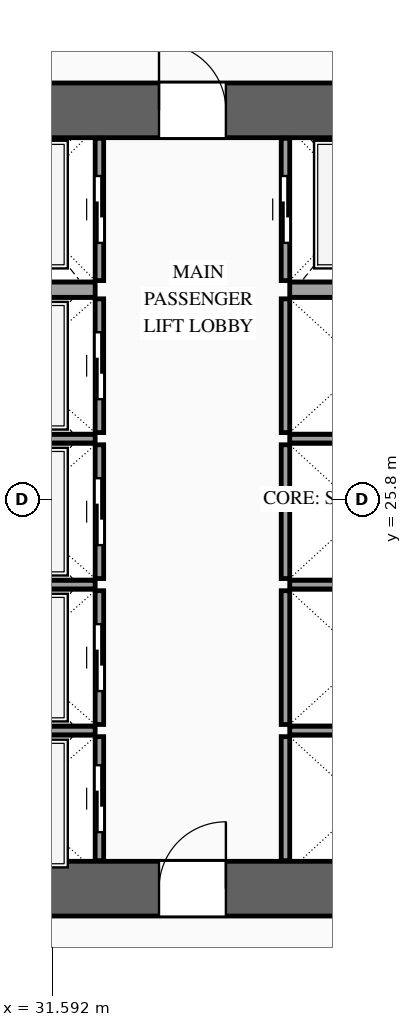
"""IFC4 building model, lengths in metres.
Left out: names, types, materials, properties, quantities, classifications, styles, units other than length and angle.
Written with IfcOpenShell. Run it as: python <this file> out.ifc"""

import sys

from ifc_helpers import new_model, si_unit, direction, frame, frame_2d, origin, place, context, subcontext, project, spatial, rectangle, extrude, source, transform, mapped, element, fill, save


model = new_model("IFC4")
c1 = context("Model", 3, precision=1e-05, world=origin(), true_north=direction((0.0, 1.0)))
c2 = subcontext(c1, "Body", "Model", "MODEL_VIEW")
j1 = project(units=[si_unit("LENGTHUNIT", "METRE"), si_unit("PLANEANGLEUNIT", "RADIAN")], contexts=[c1])
p1 = place(None, origin())
s1 = spatial("IfcSite", under=j1, at=p1, CompositionType="ELEMENT")
p2 = place(p1, origin())
s2 = spatial("IfcBuilding", under=s1, at=p2, CompositionType="ELEMENT")
p3 = place(p2, frame((0.0, 0.0, 82.0)))
s3 = spatial("IfcBuildingStorey", under=s2, at=p3, CompositionType="ELEMENT", Elevation=82.0)
p4 = place(p3, frame((23.35, 19.4, 0.0), z_axis=(0.0, 0.0, 1.0), x_axis=(1.0, 0.0, 0.0)))
e1 = element("IfcWall", 1, at=p4, inside=s3, PredefinedType="SHEAR", context=c2, shape_type="SweptSolid", body=[
    extrude(rectangle(XDim=27.3, YDim=0.9, at=frame_2d((13.65, 0.0))), origin(), (0.0, 0.0, 1.0), 3.6),
])
p5 = place(p4, frame((2.1, 0.0, 0.0)))
e2 = element("IfcOpeningElement", 2, at=p5, cuts=e1, PredefinedType="OPENING", context=c2, shape_type="SweptSolid", body=[
    extrude(rectangle(XDim=1.1, YDim=2.2, at=frame_2d((0.55, 1.1))), frame((0.0, 0.465, 0.0), z_axis=(0.0, -1.0, 0.0), x_axis=(1.0, 0.0, 0.0)), (0.0, 0.0, 1.0), 0.93),
])
p6 = place(p4, frame((10.0, 0.0, 0.0)))
e3 = element("IfcOpeningElement", 3, at=p6, cuts=e1, PredefinedType="OPENING", context=c2, shape_type="SweptSolid", body=[
    extrude(rectangle(XDim=1.1, YDim=2.2, at=frame_2d((0.55, 1.1))), frame((0.0, 0.465, 0.0), z_axis=(0.0, -1.0, 0.0), x_axis=(1.0, 0.0, 0.0)), (0.0, 0.0, 1.0), 0.93),
])
p7 = place(p4, frame((23.2, 0.0, 0.0)))
e4 = element("IfcOpeningElement", 4, at=p7, cuts=e1, PredefinedType="OPENING", context=c2, shape_type="SweptSolid", body=[
    extrude(rectangle(XDim=1.1, YDim=2.2, at=frame_2d((0.55, 1.1))), frame((0.0, 0.465, 0.0), z_axis=(0.0, -1.0, 0.0), x_axis=(1.0, 0.0, 0.0)), (0.0, 0.0, 1.0), 0.93),
])
p8 = place(p4, frame((19.82, 0.0, 0.0)))
e5 = element("IfcOpeningElement", 5, at=p8, cuts=e1, PredefinedType="OPENING", context=c2, shape_type="SweptSolid", body=[
    extrude(rectangle(XDim=0.9, YDim=2.15, at=frame_2d((0.45, 1.075))), frame((0.0, 0.465, 0.0), z_axis=(0.0, -1.0, 0.0), x_axis=(1.0, 0.0, 0.0)), (0.0, 0.0, 1.0), 0.93),
])
p9 = place(p4, frame((18.38, 0.0, 0.0)))
e6 = element("IfcOpeningElement", 6, at=p9, cuts=e1, PredefinedType="OPENING", context=c2, shape_type="SweptSolid", body=[
    extrude(rectangle(XDim=0.9, YDim=2.15, at=frame_2d((0.45, 1.075))), frame((0.0, 0.465, 0.0), z_axis=(0.0, -1.0, 0.0), x_axis=(1.0, 0.0, 0.0)), (0.0, 0.0, 1.0), 0.93),
])
p10 = place(p3, frame((23.35, 32.2, 0.0), z_axis=(0.0, 0.0, 1.0), x_axis=(1.0, 0.0, 0.0)))
e7 = element("IfcWall", 7, at=p10, inside=s3, PredefinedType="SHEAR", context=c2, shape_type="SweptSolid", body=[
    extrude(rectangle(XDim=27.3, YDim=0.9, at=frame_2d((13.65, 0.0))), origin(), (0.0, 0.0, 1.0), 3.6),
])
p11 = place(p10, frame((4.72, 0.0, 0.0)))
e8 = element("IfcOpeningElement", 8, at=p11, cuts=e7, PredefinedType="OPENING", context=c2, shape_type="SweptSolid", body=[
    extrude(rectangle(XDim=0.9, YDim=2.15, at=frame_2d((0.45, 1.075))), frame((0.0, 0.465, 0.0), z_axis=(0.0, -1.0, 0.0), x_axis=(1.0, 0.0, 0.0)), (0.0, 0.0, 1.0), 0.93),
])
p12 = place(p10, frame((10.0, 0.0, 0.0)))
e9 = element("IfcOpeningElement", 9, at=p12, cuts=e7, PredefinedType="OPENING", context=c2, shape_type="SweptSolid", body=[
    extrude(rectangle(XDim=1.1, YDim=2.2, at=frame_2d((0.55, 1.1))), frame((0.0, 0.465, 0.0), z_axis=(0.0, -1.0, 0.0), x_axis=(1.0, 0.0, 0.0)), (0.0, 0.0, 1.0), 0.93),
])
p13 = place(p10, frame((15.85, 0.0, 0.0)))
e10 = element("IfcOpeningElement", 10, at=p13, cuts=e7, PredefinedType="OPENING", context=c2, shape_type="SweptSolid", body=[
    extrude(rectangle(XDim=1.1, YDim=2.2, at=frame_2d((0.55, 1.1))), frame((0.0, 0.465, 0.0), z_axis=(0.0, -1.0, 0.0), x_axis=(1.0, 0.0, 0.0)), (0.0, 0.0, 1.0), 0.93),
])
p14 = place(p3, frame((32.37, 19.86, 0.0), z_axis=(0.0, 0.0, 1.0), x_axis=(0.0, 1.0, 0.0)))
e11 = element("IfcWall", 11, at=p14, inside=s3, PredefinedType="SOLIDWALL", context=c2, shape_type="SweptSolid", body=[
    extrude(rectangle(XDim=2.04, YDim=0.14, at=frame_2d((1.02, 0.0))), origin(), (0.0, 0.0, 1.0), 3.32),
])
p15 = place(p14, frame((0.47, 0.0, 0.0)))
e12 = element("IfcOpeningElement", 12, at=p15, cuts=e11, PredefinedType="OPENING", context=c2, shape_type="SweptSolid", body=[
    extrude(rectangle(XDim=1.1, YDim=2.2, at=frame_2d((0.55, 1.1))), frame((0.0, 0.085, 0.0), z_axis=(0.0, -1.0, 0.0), x_axis=(1.0, 0.0, 0.0)), (0.0, 0.0, 1.0), 0.17),
])
m1 = source(origin(), c2, "Body", "SweptSolid", [
    extrude(rectangle(XDim=2.5, YDim=0.14, at=frame_2d((1.25, 0.0))), origin(), (0.0, 0.0, 1.0), 3.32),
])
p16 = place(p3, frame((29.8, 22.0, 0.0), z_axis=(0.0, 0.0, 1.0), x_axis=(1.0, 0.0, 0.0)))
e13 = element("IfcWall", 13, at=p16, inside=s3, PredefinedType="SOLIDWALL", context=c2, shape_type="MappedRepresentation", body=[
    mapped(m1, transform((0.0, 0.0, 0.0), scale=1.0)),
])
p17 = place(p3, frame((32.37, 22.1, 0.0), z_axis=(0.0, 0.0, 1.0), x_axis=(0.0, 1.0, 0.0)))
e14 = element("IfcWall", 14, at=p17, inside=s3, PredefinedType="SOLIDWALL", context=c2, shape_type="SweptSolid", body=[
    extrude(rectangle(XDim=2.2, YDim=0.14, at=frame_2d((1.1, 0.0))), origin(), (0.0, 0.0, 1.0), 3.32),
])
p18 = place(p17, frame((0.55, 0.0, 0.0)))
e15 = element("IfcOpeningElement", 15, at=p18, cuts=e14, PredefinedType="OPENING", context=c2, shape_type="SweptSolid", body=[
    extrude(rectangle(XDim=1.1, YDim=2.2, at=frame_2d((0.55, 1.1))), frame((0.0, 0.085, 0.0), z_axis=(0.0, -1.0, 0.0), x_axis=(1.0, 0.0, 0.0)), (0.0, 0.0, 1.0), 0.17),
])
p19 = place(p3, frame((29.8, 24.4, 0.0), z_axis=(0.0, 0.0, 1.0), x_axis=(1.0, 0.0, 0.0)))
e16 = element("IfcWall", 16, at=p19, inside=s3, PredefinedType="SOLIDWALL", context=c2, shape_type="MappedRepresentation", body=[
    mapped(m1, transform((0.0, 0.0, 0.0), scale=1.0)),
])
p20 = place(p3, frame((32.37, 24.5, 0.0), z_axis=(0.0, 0.0, 1.0), x_axis=(0.0, 1.0, 0.0)))
e17 = element("IfcWall", 17, at=p20, inside=s3, PredefinedType="SOLIDWALL", context=c2, shape_type="SweptSolid", body=[
    extrude(rectangle(XDim=2.2, YDim=0.14, at=frame_2d((1.1, 0.0))), origin(), (0.0, 0.0, 1.0), 3.32),
])
p21 = place(p20, frame((0.55, 0.0, 0.0)))
e18 = element("IfcOpeningElement", 18, at=p21, cuts=e17, PredefinedType="OPENING", context=c2, shape_type="SweptSolid", body=[
    extrude(rectangle(XDim=1.1, YDim=2.2, at=frame_2d((0.55, 1.1))), frame((0.0, 0.085, 0.0), z_axis=(0.0, -1.0, 0.0), x_axis=(1.0, 0.0, 0.0)), (0.0, 0.0, 1.0), 0.17),
])
p22 = place(p3, frame((29.8, 26.8, 0.0), z_axis=(0.0, 0.0, 1.0), x_axis=(1.0, 0.0, 0.0)))
e19 = element("IfcWall", 19, at=p22, inside=s3, PredefinedType="SOLIDWALL", context=c2, shape_type="MappedRepresentation", body=[
    mapped(m1, transform((0.0, 0.0, 0.0), scale=1.0)),
])
p23 = place(p3, frame((32.37, 26.9, 0.0), z_axis=(0.0, 0.0, 1.0), x_axis=(0.0, 1.0, 0.0)))
e20 = element("IfcWall", 20, at=p23, inside=s3, PredefinedType="SOLIDWALL", context=c2, shape_type="SweptSolid", body=[
    extrude(rectangle(XDim=2.2, YDim=0.14, at=frame_2d((1.1, 0.0))), origin(), (0.0, 0.0, 1.0), 3.32),
])
p24 = place(p23, frame((0.55, 0.0, 0.0)))
e21 = element("IfcOpeningElement", 21, at=p24, cuts=e20, PredefinedType="OPENING", context=c2, shape_type="SweptSolid", body=[
    extrude(rectangle(XDim=1.1, YDim=2.2, at=frame_2d((0.55, 1.1))), frame((0.0, 0.085, 0.0), z_axis=(0.0, -1.0, 0.0), x_axis=(1.0, 0.0, 0.0)), (0.0, 0.0, 1.0), 0.17),
])
p25 = place(p3, frame((32.37, 29.4, 0.0), z_axis=(0.0, 0.0, 1.0), x_axis=(0.0, 1.0, 0.0)))
e22 = element("IfcWall", 22, at=p25, inside=s3, PredefinedType="SOLIDWALL", context=c2, shape_type="SweptSolid", body=[
    extrude(rectangle(XDim=2.34, YDim=0.14, at=frame_2d((1.17, 0.0))), origin(), (0.0, 0.0, 1.0), 3.32),
])
p26 = place(p25, frame((0.62, 0.0, 0.0)))
e23 = element("IfcOpeningElement", 23, at=p26, cuts=e22, PredefinedType="OPENING", context=c2, shape_type="SweptSolid", body=[
    extrude(rectangle(XDim=1.1, YDim=2.2, at=frame_2d((0.55, 1.1))), frame((0.0, 0.085, 0.0), z_axis=(0.0, -1.0, 0.0), x_axis=(1.0, 0.0, 0.0)), (0.0, 0.0, 1.0), 0.17),
])
m2 = source(origin(), c2, "Body", "SweptSolid", [
    extrude(rectangle(XDim=2.5, YDim=0.25, at=frame_2d((1.25, 0.0))), origin(), (0.0, 0.0, 1.0), 3.32),
])
p27 = place(p3, frame((29.8, 29.25, 0.0), z_axis=(0.0, 0.0, 1.0), x_axis=(1.0, 0.0, 0.0)))
e24 = element("IfcWall", 24, at=p27, inside=s3, PredefinedType="SOLIDWALL", context=c2, shape_type="MappedRepresentation", body=[
    mapped(m2, transform((0.0, 0.0, 0.0), scale=1.0)),
])
m3 = source(origin(), c2, "Body", "SweptSolid", [
    extrude(rectangle(XDim=2.04, YDim=0.14, at=frame_2d((1.02, 0.0))), origin(), (0.0, 0.0, 1.0), 3.32),
])
p28 = place(p3, frame((35.43, 19.86, 0.0), z_axis=(0.0, 0.0, 1.0), x_axis=(0.0, 1.0, 0.0)))
e25 = element("IfcWall", 25, at=p28, inside=s3, PredefinedType="SOLIDWALL", context=c2, shape_type="MappedRepresentation", body=[
    mapped(m3, transform((0.0, 0.0, 0.0), scale=1.0)),
])
m4 = source(origin(), c2, "Body", "SweptSolid", [
    extrude(rectangle(XDim=2.4, YDim=0.14, at=frame_2d((1.2, 0.0))), origin(), (0.0, 0.0, 1.0), 3.32),
])
p29 = place(p3, frame((35.5, 22.0, 0.0), z_axis=(0.0, 0.0, 1.0), x_axis=(1.0, 0.0, 0.0)))
e26 = element("IfcWall", 26, at=p29, inside=s3, PredefinedType="SOLIDWALL", context=c2, shape_type="MappedRepresentation", body=[
    mapped(m4, transform((0.0, 0.0, 0.0), scale=1.0)),
])
m5 = source(origin(), c2, "Body", "SweptSolid", [
    extrude(rectangle(XDim=2.2, YDim=0.14, at=frame_2d((1.1, 0.0))), origin(), (0.0, 0.0, 1.0), 3.32),
])
p30 = place(p3, frame((35.43, 22.1, 0.0), z_axis=(0.0, 0.0, 1.0), x_axis=(0.0, 1.0, 0.0)))
e27 = element("IfcWall", 27, at=p30, inside=s3, PredefinedType="SOLIDWALL", context=c2, shape_type="MappedRepresentation", body=[
    mapped(m5, transform((0.0, 0.0, 0.0), scale=1.0)),
])
p31 = place(p3, frame((35.5, 24.4, 0.0), z_axis=(0.0, 0.0, 1.0), x_axis=(1.0, 0.0, 0.0)))
e28 = element("IfcWall", 28, at=p31, inside=s3, PredefinedType="SOLIDWALL", context=c2, shape_type="MappedRepresentation", body=[
    mapped(m4, transform((0.0, 0.0, 0.0), scale=1.0)),
])
p32 = place(p3, frame((35.43, 24.5, 0.0), z_axis=(0.0, 0.0, 1.0), x_axis=(0.0, 1.0, 0.0)))
e29 = element("IfcWall", 29, at=p32, inside=s3, PredefinedType="SOLIDWALL", context=c2, shape_type="MappedRepresentation", body=[
    mapped(m5, transform((0.0, 0.0, 0.0), scale=1.0)),
])
p33 = place(p3, frame((35.5, 26.8, 0.0), z_axis=(0.0, 0.0, 1.0), x_axis=(1.0, 0.0, 0.0)))
e30 = element("IfcWall", 30, at=p33, inside=s3, PredefinedType="SOLIDWALL", context=c2, shape_type="MappedRepresentation", body=[
    mapped(m4, transform((0.0, 0.0, 0.0), scale=1.0)),
])
m6 = source(origin(), c2, "Body", "SweptSolid", [
    extrude(rectangle(XDim=2.2, YDim=0.14, at=frame_2d((1.1, 0.0))), origin(), (0.0, 0.0, 1.0), 3.32),
])
p34 = place(p3, frame((35.43, 26.9, 0.0), z_axis=(0.0, 0.0, 1.0), x_axis=(0.0, 1.0, 0.0)))
e31 = element("IfcWall", 31, at=p34, inside=s3, PredefinedType="SOLIDWALL", context=c2, shape_type="MappedRepresentation", body=[
    mapped(m6, transform((0.0, 0.0, 0.0), scale=1.0)),
])
p35 = place(p3, frame((35.43, 29.4, 0.0), z_axis=(0.0, 0.0, 1.0), x_axis=(0.0, 1.0, 0.0)))
e32 = element("IfcWall", 32, at=p35, inside=s3, PredefinedType="SOLIDWALL", context=c2, shape_type="SweptSolid", body=[
    extrude(rectangle(XDim=2.34, YDim=0.14, at=frame_2d((1.17, 0.0))), origin(), (0.0, 0.0, 1.0), 3.32),
])
p36 = place(p35, frame((0.62, 0.0, 0.0)))
e33 = element("IfcOpeningElement", 33, at=p36, cuts=e32, PredefinedType="OPENING", context=c2, shape_type="SweptSolid", body=[
    extrude(rectangle(XDim=1.1, YDim=2.2, at=frame_2d((0.55, 1.1))), frame((0.0, 0.085, 0.0), z_axis=(0.0, -1.0, 0.0), x_axis=(1.0, 0.0, 0.0)), (0.0, 0.0, 1.0), 0.17),
])
m7 = source(origin(), c2, "Body", "SweptSolid", [
    extrude(rectangle(XDim=2.4, YDim=0.25, at=frame_2d((1.2, 0.0))), origin(), (0.0, 0.0, 1.0), 3.32),
])
p37 = place(p3, frame((35.5, 29.25, 0.0), z_axis=(0.0, 0.0, 1.0), x_axis=(1.0, 0.0, 0.0)))
e34 = element("IfcWall", 34, at=p37, inside=s3, PredefinedType="SOLIDWALL", context=c2, shape_type="MappedRepresentation", body=[
    mapped(m7, transform((0.0, 0.0, 0.0), scale=1.0)),
])
m8 = source(origin(), c2, "Body", "SweptSolid", [
    extrude(rectangle(XDim=1.1, YDim=2.2, at=frame_2d((0.55, 1.1))), frame((0.0, 0.025, 0.0), z_axis=(0.0, -1.0, 0.0), x_axis=(1.0, 0.0, 0.0)), (0.0, 0.0, 1.0), 0.05),
])
p38 = place(p15, origin())
e35 = element("IfcDoor", 35, at=p38, inside=s3, OperationType="SLIDING_TO_LEFT", PredefinedType="DOOR", context=c2, shape_type="MappedRepresentation", body=[
    mapped(m8, transform((0.0, 0.0, 0.0), scale=1.0)),
])
fill(e12, e35)
p39 = place(p18, origin())
e36 = element("IfcDoor", 36, at=p39, inside=s3, OperationType="SLIDING_TO_RIGHT", PredefinedType="DOOR", context=c2, shape_type="MappedRepresentation", body=[
    mapped(m8, transform((0.0, 0.0, 0.0), scale=1.0)),
])
fill(e15, e36)
p40 = place(p21, origin())
e37 = element("IfcDoor", 37, at=p40, inside=s3, OperationType="SLIDING_TO_LEFT", PredefinedType="DOOR", context=c2, shape_type="MappedRepresentation", body=[
    mapped(m8, transform((0.0, 0.0, 0.0), scale=1.0)),
])
fill(e18, e37)
p41 = place(p24, origin())
e38 = element("IfcDoor", 38, at=p41, inside=s3, OperationType="SLIDING_TO_RIGHT", PredefinedType="DOOR", context=c2, shape_type="MappedRepresentation", body=[
    mapped(m8, transform((0.0, 0.0, 0.0), scale=1.0)),
])
fill(e21, e38)
p42 = place(p26, origin())
e39 = element("IfcDoor", 39, at=p42, inside=s3, OperationType="SLIDING_TO_LEFT", PredefinedType="DOOR", context=c2, shape_type="MappedRepresentation", body=[
    mapped(m8, transform((0.0, 0.0, 0.0), scale=1.0)),
])
fill(e23, e39)
p43 = place(p36, origin())
e40 = element("IfcDoor", 40, at=p43, inside=s3, OperationType="SLIDING_TO_RIGHT", PredefinedType="DOOR", context=c2, shape_type="MappedRepresentation", body=[
    mapped(m8, transform((0.0, 0.0, 0.0), scale=1.0)),
])
fill(e33, e40)
m9 = source(origin(), c2, "Body", "SweptSolid", [
    extrude(rectangle(XDim=1.1, YDim=2.2, at=frame_2d((0.55, 1.1))), frame((0.0, 0.025, 0.0), z_axis=(0.0, -1.0, 0.0), x_axis=(1.0, 0.0, 0.0)), (0.0, 0.0, 1.0), 0.05),
])
p44 = place(p6, origin())
e41 = element("IfcDoor", 41, at=p44, inside=s3, OperationType="SINGLE_SWING_RIGHT", PredefinedType="DOOR", context=c2, shape_type="MappedRepresentation", body=[
    mapped(m9, transform((0.0, 0.0, 0.0), scale=1.0)),
])
fill(e3, e41)
p45 = place(p12, origin())
e42 = element("IfcDoor", 42, at=p45, inside=s3, OperationType="SINGLE_SWING_LEFT", PredefinedType="DOOR", context=c2, shape_type="MappedRepresentation", body=[
    mapped(m9, transform((0.0, 0.0, 0.0), scale=1.0)),
])
fill(e9, e42)
save(model, sys.argv[1])
